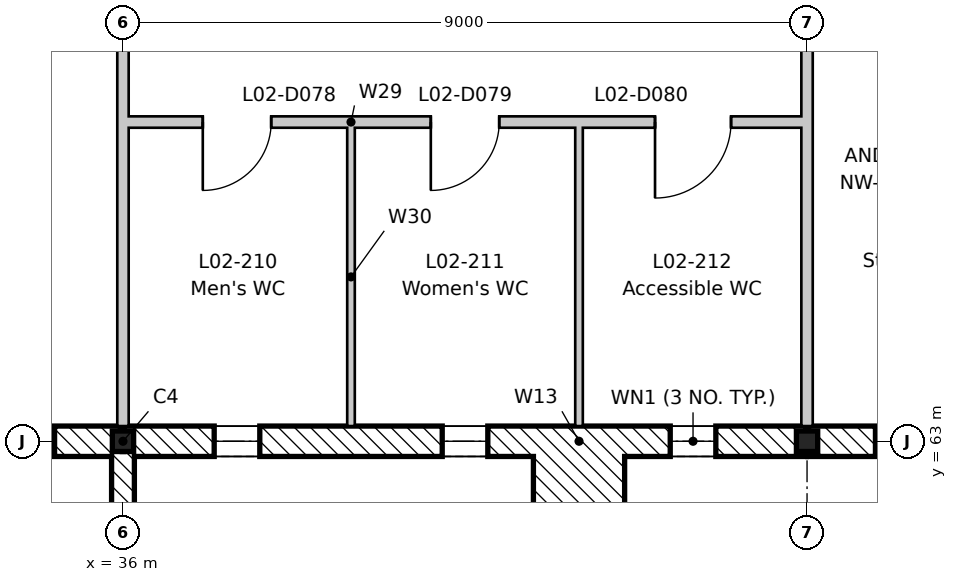
"""IFC4 building model, lengths in metres.
Left out: names, types, materials, properties, quantities, classifications, styles, units other than length and angle.
Written with IfcOpenShell. Run it as: python <this file> out.ifc"""

import sys

from ifc_helpers import new_model, si_unit, direction, frame, frame_2d, origin, origin_2d, place, context, subcontext, project, spatial, rectangle, i_section, extrude, element, fill, save


model = new_model("IFC4")
c1 = context("Model", 3, precision=1e-05, world=origin(), true_north=direction((0.0, 1.0)))
c2 = subcontext(c1, "Body", "Model", "MODEL_VIEW")
j1 = project(units=[si_unit("LENGTHUNIT", "METRE"), si_unit("PLANEANGLEUNIT", "RADIAN")], contexts=[c1])
p1 = place(None, origin())
s1 = spatial("IfcSite", under=j1, at=p1, CompositionType="ELEMENT")
p2 = place(p1, origin())
s2 = spatial("IfcBuilding", under=s1, at=p2, CompositionType="ELEMENT")
p3 = place(p2, frame((0.0, 0.0, 9.9)))
s3 = spatial("IfcBuildingStorey", under=s2, at=p3, CompositionType="ELEMENT", Elevation=9.9)
for number, where, z_axis, x_axis in (
    (1, (36.0, 63.0, -0.2), (0.0, 0.0, 1.0), (1.0, 0.0, 0.0)),
    (2, (45.0, 63.0, -0.2), (0.0, 0.0, 1.0), (1.0, 0.0, 0.0)),
):
    element("IfcColumn", number, at=place(p3, frame(where, z_axis=z_axis, x_axis=x_axis)), inside=s3, PredefinedType="COLUMN", context=c2, shape_type="SweptSolid", body=[
        extrude(i_section(OverallWidth=0.28, OverallDepth=0.27, WebThickness=0.008, FlangeThickness=0.013, FilletRadius=0.024, at=origin_2d()), origin(), (0.0, 0.0, 1.0), 4.5),
    ])
p4 = place(p3, frame((35.991, 63.0, 0.0), z_axis=(0.0, 0.0, 1.0), x_axis=(-1.0, 0.0, 0.0)))
e3 = element("IfcWall", 3, at=p4, inside=s3, PredefinedType="STANDARD", context=c2, shape_type="SweptSolid", body=[
    extrude(rectangle(XDim=8.982, YDim=0.4, at=frame_2d((4.491, 0.0))), origin(), (0.0, 0.0, 1.0), 3.9),
])
p5 = place(p4, frame((3.591, 0.0, 0.0)))
e4 = element("IfcOpeningElement", 4, at=p5, cuts=e3, PredefinedType="OPENING", context=c2, shape_type="SweptSolid", body=[
    extrude(rectangle(XDim=1.8, YDim=2.4, at=frame_2d((0.9, 1.2))), frame((0.0, 0.21, 0.0), z_axis=(0.0, -1.0, 0.0), x_axis=(1.0, 0.0, 0.0)), (0.0, 0.0, 1.0), 0.42),
])
p6 = place(p4, frame((6.891, 0.0, 0.9)))
e5 = element("IfcOpeningElement", 5, at=p6, cuts=e3, PredefinedType="OPENING", context=c2, shape_type="SweptSolid", body=[
    extrude(rectangle(XDim=1.2, YDim=2.4, at=frame_2d((0.6, 1.2))), frame((0.0, 0.21, 0.0), z_axis=(0.0, -1.0, 0.0), x_axis=(1.0, 0.0, 0.0)), (0.0, 0.0, 1.0), 0.42),
])
p7 = place(p4, frame((0.891, 0.0, 0.9)))
e6 = element("IfcOpeningElement", 6, at=p7, cuts=e3, PredefinedType="OPENING", context=c2, shape_type="SweptSolid", body=[
    extrude(rectangle(XDim=1.2, YDim=2.4, at=frame_2d((0.6, 1.2))), frame((0.0, 0.21, 0.0), z_axis=(0.0, -1.0, 0.0), x_axis=(1.0, 0.0, 0.0)), (0.0, 0.0, 1.0), 0.42),
])
p8 = place(p3, frame((44.991, 63.0, 0.0), z_axis=(0.0, 0.0, 1.0), x_axis=(-1.0, 0.0, 0.0)))
e7 = element("IfcWall", 7, at=p8, inside=s3, PredefinedType="STANDARD", context=c2, shape_type="SweptSolid", body=[
    extrude(rectangle(XDim=8.982, YDim=0.4, at=frame_2d((4.491, 0.0))), origin(), (0.0, 0.0, 1.0), 3.9),
])
p9 = place(p8, frame((7.191, 0.0, 1.5)))
e8 = element("IfcOpeningElement", 8, at=p9, cuts=e7, PredefinedType="OPENING", context=c2, shape_type="SweptSolid", body=[
    extrude(rectangle(XDim=0.6, YDim=1.2, at=frame_2d((0.3, 0.6))), frame((0.0, 0.21, 0.0), z_axis=(0.0, -1.0, 0.0), x_axis=(1.0, 0.0, 0.0)), (0.0, 0.0, 1.0), 0.42),
])
p10 = place(p8, frame((4.191, 0.0, 1.5)))
e9 = element("IfcOpeningElement", 9, at=p10, cuts=e7, PredefinedType="OPENING", context=c2, shape_type="SweptSolid", body=[
    extrude(rectangle(XDim=0.6, YDim=1.2, at=frame_2d((0.3, 0.6))), frame((0.0, 0.21, 0.0), z_axis=(0.0, -1.0, 0.0), x_axis=(1.0, 0.0, 0.0)), (0.0, 0.0, 1.0), 0.42),
])
p11 = place(p8, frame((1.191, 0.0, 1.5)))
e10 = element("IfcOpeningElement", 10, at=p11, cuts=e7, PredefinedType="OPENING", context=c2, shape_type="SweptSolid", body=[
    extrude(rectangle(XDim=0.6, YDim=1.2, at=frame_2d((0.3, 0.6))), frame((0.0, 0.21, 0.0), z_axis=(0.0, -1.0, 0.0), x_axis=(1.0, 0.0, 0.0)), (0.0, 0.0, 1.0), 0.42),
])
p12 = place(p3, frame((53.991, 63.0, 0.0), z_axis=(0.0, 0.0, 1.0), x_axis=(-1.0, 0.0, 0.0)))
e11 = element("IfcWall", 11, at=p12, inside=s3, PredefinedType="STANDARD", context=c2, shape_type="SweptSolid", body=[
    extrude(rectangle(XDim=8.982, YDim=0.4, at=frame_2d((4.491, 0.0))), origin(), (0.0, 0.0, 1.0), 3.9),
])
p13 = place(p12, frame((6.891, 0.0, 0.9)))
e12 = element("IfcOpeningElement", 12, at=p13, cuts=e11, PredefinedType="OPENING", context=c2, shape_type="SweptSolid", body=[
    extrude(rectangle(XDim=1.2, YDim=2.4, at=frame_2d((0.6, 1.2))), frame((0.0, 0.21, 0.0), z_axis=(0.0, -1.0, 0.0), x_axis=(1.0, 0.0, 0.0)), (0.0, 0.0, 1.0), 0.42),
])
p14 = place(p12, frame((3.891, 0.0, 0.9)))
e13 = element("IfcOpeningElement", 13, at=p14, cuts=e11, PredefinedType="OPENING", context=c2, shape_type="SweptSolid", body=[
    extrude(rectangle(XDim=1.2, YDim=2.7, at=frame_2d((0.6, 1.35))), frame((0.0, 0.21, 0.0), z_axis=(0.0, -1.0, 0.0), x_axis=(1.0, 0.0, 0.0)), (0.0, 0.0, 1.0), 0.42),
])
p15 = place(p3, frame((41.4, 62.2, 0.0), z_axis=(0.0, 0.0, 1.0), x_axis=(1.0, 0.0, 0.0)))
e14 = element("IfcWall", 14, at=p15, inside=s3, PredefinedType="STANDARD", context=c2, shape_type="SweptSolid", body=[
    extrude(rectangle(XDim=1.2, YDim=1.2, at=frame_2d((0.6, 0.0))), origin(), (0.0, 0.0, 1.0), 4.5),
])
p16 = place(p3, frame((36.0, 62.865, 0.0), z_axis=(0.0, 0.0, 1.0), x_axis=(0.0, -1.0, 0.0)))
e15 = element("IfcWall", 15, at=p16, inside=s3, PredefinedType="STANDARD", context=c2, shape_type="SweptSolid", body=[
    extrude(rectangle(XDim=2.265, YDim=0.3, at=frame_2d((1.132, 0.0))), origin(), (0.0, 0.0, 1.0), 3.97),
])
for number, where, z_axis, x_axis in (
    (16, (36.0, 63.2, 0.0), (0.0, 0.0, 1.0), (0.0, 1.0, 0.0)),
    (17, (45.0, 63.2, 0.0), (0.0, 0.0, 1.0), (0.0, 1.0, 0.0)),
):
    element("IfcWall", number, at=place(p3, frame(where, z_axis=z_axis, x_axis=x_axis)), inside=s3, PredefinedType="PARTITIONING", context=c2, shape_type="SweptSolid", body=[
        extrude(rectangle(XDim=7.225, YDim=0.15, at=frame_2d((3.613, 0.0))), origin(), (0.0, 0.0, 1.0), 3.95),
    ])
p17 = place(p3, frame((36.075, 67.2, 0.0), z_axis=(0.0, 0.0, 1.0), x_axis=(1.0, 0.0, 0.0)))
e18 = element("IfcWall", 18, at=p17, inside=s3, PredefinedType="PARTITIONING", context=c2, shape_type="SweptSolid", body=[
    extrude(rectangle(XDim=8.85, YDim=0.15, at=frame_2d((4.425, 0.0))), origin(), (0.0, 0.0, 1.0), 4.3),
])
p18 = place(p17, frame((0.975, 0.0, 0.0)))
e19 = element("IfcOpeningElement", 19, at=p18, cuts=e18, PredefinedType="OPENING", context=c2, shape_type="SweptSolid", body=[
    extrude(rectangle(XDim=0.9, YDim=2.1, at=frame_2d((0.45, 1.05))), frame((0.0, 0.085, 0.0), z_axis=(0.0, -1.0, 0.0), x_axis=(1.0, 0.0, 0.0)), (0.0, 0.0, 1.0), 0.17),
])
p19 = place(p17, frame((3.975, 0.0, 0.0)))
e20 = element("IfcOpeningElement", 20, at=p19, cuts=e18, PredefinedType="OPENING", context=c2, shape_type="SweptSolid", body=[
    extrude(rectangle(XDim=0.9, YDim=2.1, at=frame_2d((0.45, 1.05))), frame((0.0, 0.085, 0.0), z_axis=(0.0, -1.0, 0.0), x_axis=(1.0, 0.0, 0.0)), (0.0, 0.0, 1.0), 0.17),
])
p20 = place(p17, frame((6.925, 0.0, 0.0)))
e21 = element("IfcOpeningElement", 21, at=p20, cuts=e18, PredefinedType="OPENING", context=c2, shape_type="SweptSolid", body=[
    extrude(rectangle(XDim=1.0, YDim=2.1, at=frame_2d((0.5, 1.05))), frame((0.0, 0.085, 0.0), z_axis=(0.0, -1.0, 0.0), x_axis=(1.0, 0.0, 0.0)), (0.0, 0.0, 1.0), 0.17),
])
for number, where, z_axis, x_axis in (
    (22, (39.0, 63.2, 0.0), (0.0, 0.0, 1.0), (0.0, 1.0, 0.0)),
    (23, (42.0, 63.2, 0.0), (0.0, 0.0, 1.0), (0.0, 1.0, 0.0)),
):
    element("IfcWall", number, at=place(p3, frame(where, z_axis=z_axis, x_axis=x_axis)), inside=s3, PredefinedType="PARTITIONING", context=c2, shape_type="SweptSolid", body=[
        extrude(rectangle(XDim=3.925, YDim=0.1, at=frame_2d((1.962, 0.0))), origin(), (0.0, 0.0, 1.0), 4.3),
    ])
p21 = place(p7, origin())
e24 = element("IfcWindow", 24, at=p21, inside=s3, PartitioningType="SINGLE_PANEL", PredefinedType="WINDOW", context=c2, shape_type="SweptSolid", body=[
    extrude(rectangle(XDim=1.2, YDim=2.4, at=frame_2d((0.6, 1.2))), frame((0.0, -0.12, 0.0), z_axis=(0.0, -1.0, 0.0), x_axis=(1.0, 0.0, 0.0)), (0.0, 0.0, 1.0), 0.06),
])
fill(e6, e24)
p22 = place(p9, origin())
e25 = element("IfcWindow", 25, at=p22, inside=s3, PartitioningType="SINGLE_PANEL", PredefinedType="WINDOW", context=c2, shape_type="SweptSolid", body=[
    extrude(rectangle(XDim=0.6, YDim=1.2, at=frame_2d((0.3, 0.6))), frame((0.0, -0.12, 0.0), z_axis=(0.0, -1.0, 0.0), x_axis=(1.0, 0.0, 0.0)), (0.0, 0.0, 1.0), 0.06),
])
fill(e8, e25)
p23 = place(p10, origin())
e26 = element("IfcWindow", 26, at=p23, inside=s3, PartitioningType="SINGLE_PANEL", PredefinedType="WINDOW", context=c2, shape_type="SweptSolid", body=[
    extrude(rectangle(XDim=0.6, YDim=1.2, at=frame_2d((0.3, 0.6))), frame((0.0, -0.12, 0.0), z_axis=(0.0, -1.0, 0.0), x_axis=(1.0, 0.0, 0.0)), (0.0, 0.0, 1.0), 0.06),
])
fill(e9, e26)
p24 = place(p11, origin())
e27 = element("IfcWindow", 27, at=p24, inside=s3, PartitioningType="SINGLE_PANEL", PredefinedType="WINDOW", context=c2, shape_type="SweptSolid", body=[
    extrude(rectangle(XDim=0.6, YDim=1.2, at=frame_2d((0.3, 0.6))), frame((0.0, -0.12, 0.0), z_axis=(0.0, -1.0, 0.0), x_axis=(1.0, 0.0, 0.0)), (0.0, 0.0, 1.0), 0.06),
])
fill(e10, e27)
p25 = place(p13, origin())
e28 = element("IfcWindow", 28, at=p25, inside=s3, PartitioningType="SINGLE_PANEL", PredefinedType="WINDOW", context=c2, shape_type="SweptSolid", body=[
    extrude(rectangle(XDim=1.2, YDim=2.4, at=frame_2d((0.6, 1.2))), frame((0.0, -0.12, 0.0), z_axis=(0.0, -1.0, 0.0), x_axis=(1.0, 0.0, 0.0)), (0.0, 0.0, 1.0), 0.06),
])
fill(e12, e28)
p26 = place(p18, frame((0.9, 0.0, 0.0), z_axis=(0.0, 0.0, 1.0), x_axis=(-1.0, 0.0, 0.0)))
e29 = element("IfcDoor", 29, at=p26, inside=s3, OperationType="SINGLE_SWING_RIGHT", PredefinedType="DOOR", context=c2, shape_type="SweptSolid", body=[
    extrude(rectangle(XDim=0.9, YDim=2.1, at=frame_2d((0.45, 1.05))), frame((0.0, 0.025, 0.0), z_axis=(0.0, -1.0, 0.0), x_axis=(1.0, 0.0, 0.0)), (0.0, 0.0, 1.0), 0.05),
])
fill(e19, e29)
p27 = place(p19, frame((0.9, 0.0, 0.0), z_axis=(0.0, 0.0, 1.0), x_axis=(-1.0, 0.0, 0.0)))
e30 = element("IfcDoor", 30, at=p27, inside=s3, OperationType="SINGLE_SWING_RIGHT", PredefinedType="DOOR", context=c2, shape_type="SweptSolid", body=[
    extrude(rectangle(XDim=0.9, YDim=2.1, at=frame_2d((0.45, 1.05))), frame((0.0, 0.025, 0.0), z_axis=(0.0, -1.0, 0.0), x_axis=(1.0, 0.0, 0.0)), (0.0, 0.0, 1.0), 0.05),
])
fill(e20, e30)
p28 = place(p20, frame((1.0, 0.0, 0.0), z_axis=(0.0, 0.0, 1.0), x_axis=(-1.0, 0.0, 0.0)))
e31 = element("IfcDoor", 31, at=p28, inside=s3, OperationType="SINGLE_SWING_RIGHT", PredefinedType="DOOR", context=c2, shape_type="SweptSolid", body=[
    extrude(rectangle(XDim=1.0, YDim=2.1, at=frame_2d((0.5, 1.05))), frame((0.0, 0.025, 0.0), z_axis=(0.0, -1.0, 0.0), x_axis=(1.0, 0.0, 0.0)), (0.0, 0.0, 1.0), 0.05),
])
fill(e21, e31)
save(model, sys.argv[1])
